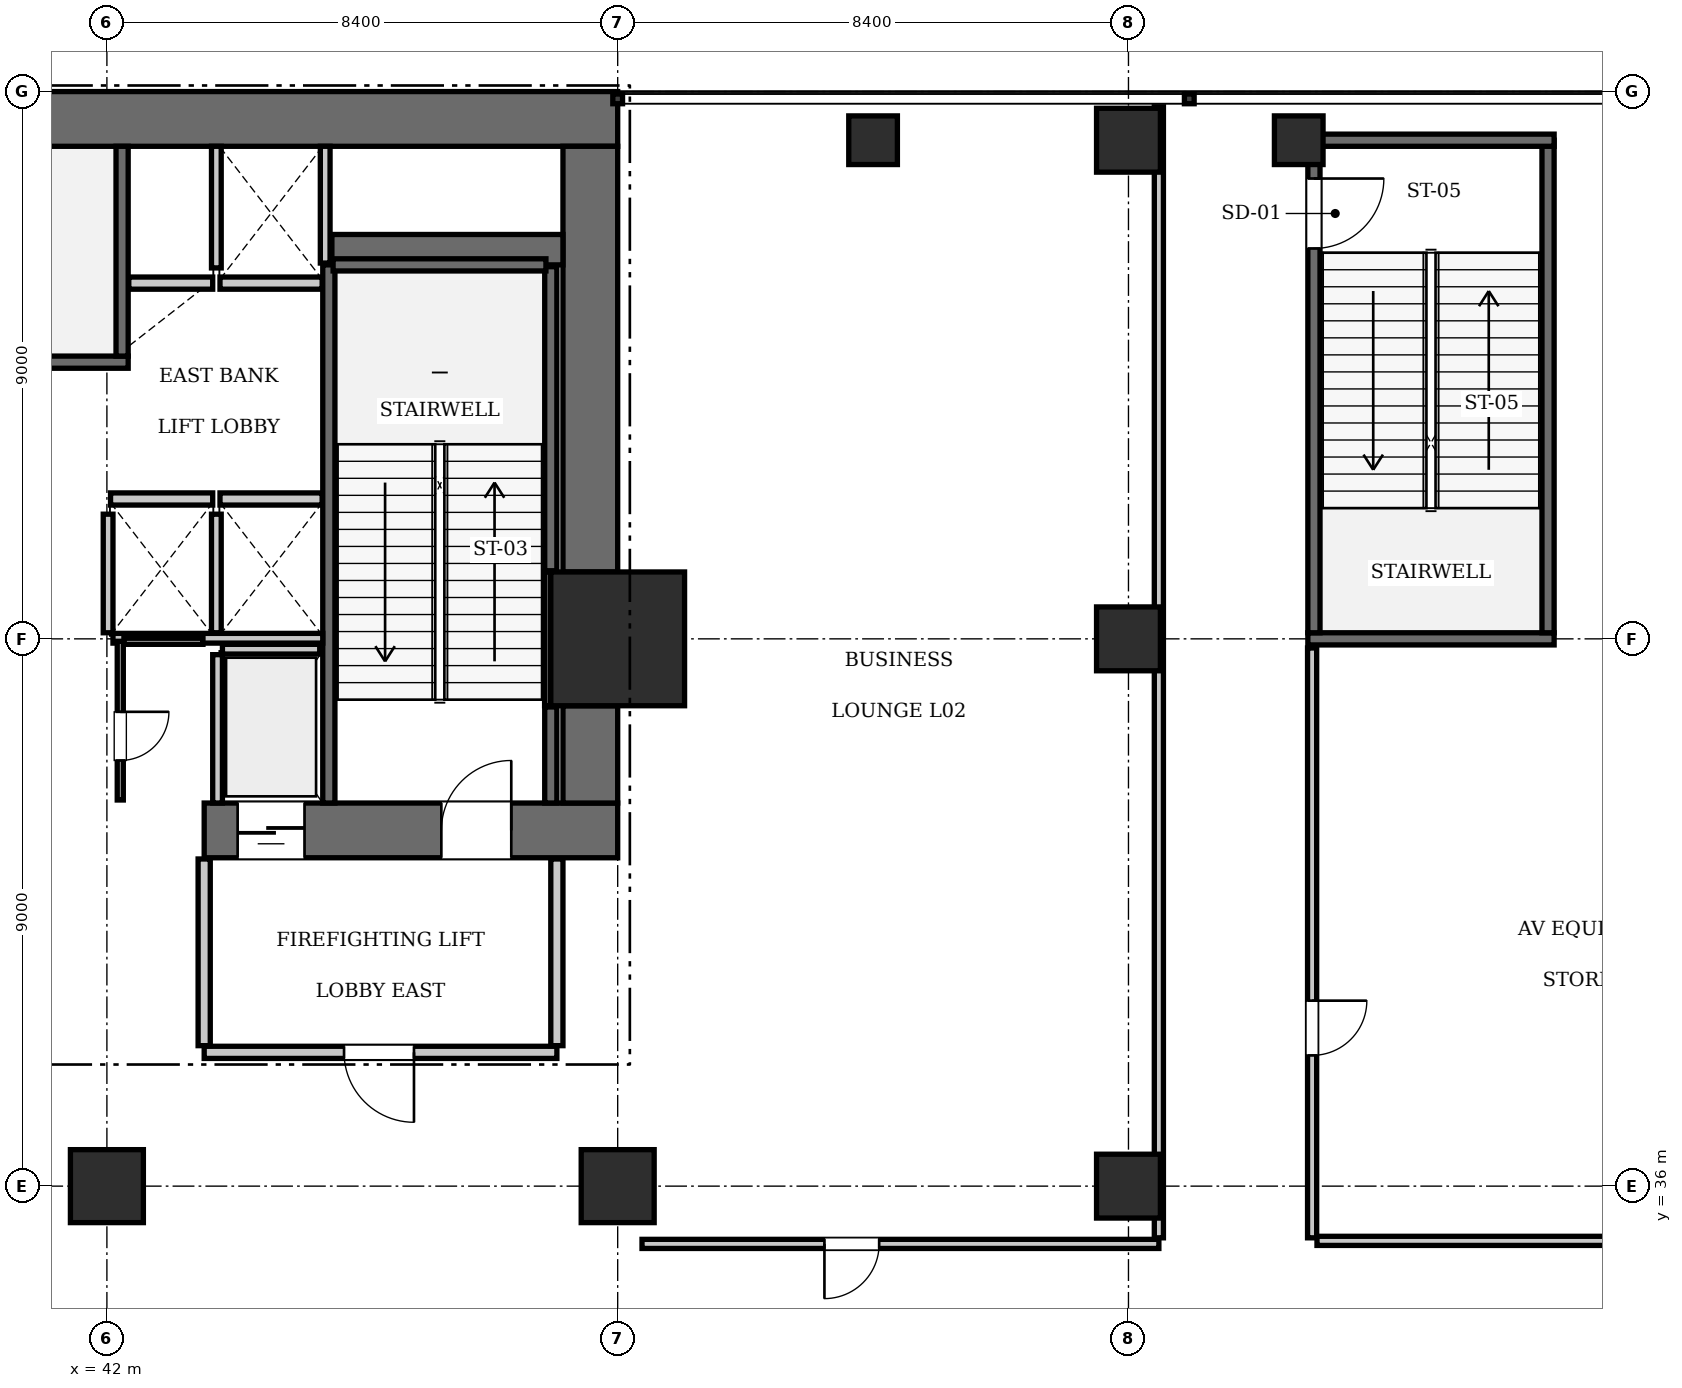
"""IFC4 building model, lengths in metres.
Left out: names, types, materials, properties, quantities, classifications, styles, units other than length and angle.
Written with IfcOpenShell. Run it as: python <this file> out.ifc"""

import sys

from ifc_helpers import new_model, si_unit, direction, frame, frame_2d, origin, origin_2d, place, context, subcontext, project, spatial, rectangle, extrude, element, fill, save


model = new_model("IFC4")
c1 = context("Model", 3, precision=1e-05, world=origin(), true_north=direction((0.0, 1.0)))
c2 = subcontext(c1, "Body", "Model", "MODEL_VIEW")
j1 = project(units=[si_unit("LENGTHUNIT", "METRE"), si_unit("PLANEANGLEUNIT", "RADIAN")], contexts=[c1])
p1 = place(None, origin())
s1 = spatial("IfcSite", under=j1, at=p1, CompositionType="ELEMENT")
p2 = place(p1, origin())
s2 = spatial("IfcBuilding", under=s1, at=p2, CompositionType="ELEMENT")
p3 = place(p2, frame((0.0, 0.0, 10.85)))
s3 = spatial("IfcBuildingStorey", under=s2, at=p3, CompositionType="ELEMENT", Elevation=10.85)
p4 = place(p3, frame((50.4, 45.0, 0.0), z_axis=(0.0, 0.0, 1.0), x_axis=(1.0, 0.0, 0.0)))
e1 = element("IfcColumn", 1, at=p4, inside=s3, PredefinedType="COLUMN", context=c2, shape_type="SweptSolid", body=[
    extrude(rectangle(XDim=2.2, YDim=2.2, at=origin_2d()), origin(), (0.0, 0.0, 1.0), 5.6),
])
p5 = place(p3, frame((25.2, 53.55, 0.0), z_axis=(0.0, 0.0, 1.0), x_axis=(1.0, 0.0, 0.0)))
e2 = element("IfcWall", 2, at=p5, inside=s3, PredefinedType="SHEAR", context=c2, shape_type="SweptSolid", body=[
    extrude(rectangle(XDim=25.2, YDim=0.9, at=frame_2d((12.6, 0.0))), origin(), (0.0, 0.0, 1.0), 5.6),
])
p6 = place(p3, frame((43.6, 41.85, 0.0), z_axis=(0.0, 0.0, 1.0), x_axis=(1.0, 0.0, 0.0)))
e3 = element("IfcWall", 3, at=p6, inside=s3, PredefinedType="SHEAR", context=c2, shape_type="SweptSolid", body=[
    extrude(rectangle(XDim=6.8, YDim=0.9, at=frame_2d((3.4, 0.0))), origin(), (0.0, 0.0, 1.0), 5.6),
])
p7 = place(p6, frame((3.9, 0.0, 0.0)))
e4 = element("IfcOpeningElement", 4, at=p7, cuts=e3, PredefinedType="OPENING", context=c2, shape_type="SweptSolid", body=[
    extrude(rectangle(XDim=1.15, YDim=2.15, at=frame_2d((0.575, 1.075))), frame((0.0, 0.46, 0.0), z_axis=(0.0, -1.0, 0.0), x_axis=(1.0, 0.0, 0.0)), (0.0, 0.0, 1.0), 0.92),
])
p8 = place(p6, frame((0.55, 0.0, 0.0)))
e5 = element("IfcOpeningElement", 5, at=p8, cuts=e3, PredefinedType="OPENING", context=c2, shape_type="SweptSolid", body=[
    extrude(rectangle(XDim=1.1, YDim=2.2, at=frame_2d((0.55, 1.1))), frame((0.0, 0.46, 0.0), z_axis=(0.0, -1.0, 0.0), x_axis=(1.0, 0.0, 0.0)), (0.0, 0.0, 1.0), 0.92),
])
p9 = place(p3, frame((49.95, 42.3, 0.0), z_axis=(0.0, 0.0, 1.0), x_axis=(0.0, 1.0, 0.0)))
e6 = element("IfcWall", 6, at=p9, inside=s3, PredefinedType="SHEAR", context=c2, shape_type="SweptSolid", body=[
    extrude(rectangle(XDim=1.6, YDim=0.9, at=frame_2d((0.8, 0.0))), origin(), (0.0, 0.0, 1.0), 5.6),
])
p10 = place(p3, frame((49.95, 46.1, 0.0), z_axis=(0.0, 0.0, 1.0), x_axis=(0.0, 1.0, 0.0)))
e7 = element("IfcWall", 7, at=p10, inside=s3, PredefinedType="SHEAR", context=c2, shape_type="SweptSolid", body=[
    extrude(rectangle(XDim=7.0, YDim=0.9, at=frame_2d((3.5, 0.0))), origin(), (0.0, 0.0, 1.0), 5.6),
])
p11 = place(p3, frame((45.7, 51.4, 0.0), z_axis=(0.0, 0.0, 1.0), x_axis=(1.0, 0.0, 0.0)))
e8 = element("IfcWall", 8, at=p11, inside=s3, PredefinedType="SHEAR", context=c2, shape_type="SweptSolid", body=[
    extrude(rectangle(XDim=3.8, YDim=0.5, at=frame_2d((1.9, 0.0))), origin(), (0.0, 0.0, 1.0), 5.6),
])
for number, where, z_axis, x_axis in (
    (9, (42.0, 36.0, 0.0), (0.0, 0.0, 1.0), (1.0, 0.0, 0.0)),
    (10, (50.4, 36.0, 0.0), (0.0, 0.0, 1.0), (1.0, 0.0, 0.0)),
):
    element("IfcColumn", number, at=place(p3, frame(where, z_axis=z_axis, x_axis=x_axis)), inside=s3, PredefinedType="COLUMN", context=c2, shape_type="SweptSolid", body=[
        extrude(rectangle(XDim=1.2, YDim=1.2, at=origin_2d()), origin(), (0.0, 0.0, 1.0), 5.6),
    ])
for number, where, z_axis, x_axis in (
    (11, (58.8, 36.0, 0.0), (0.0, 0.0, 1.0), (1.0, 0.0, 0.0)),
    (12, (58.8, 45.0, 0.0), (0.0, 0.0, 1.0), (1.0, 0.0, 0.0)),
    (13, (58.8, 53.2, 0.0), (0.0, 0.0, 1.0), (1.0, 0.0, 0.0)),
):
    element("IfcColumn", number, at=place(p3, frame(where, z_axis=z_axis, x_axis=x_axis)), inside=s3, PredefinedType="COLUMN", context=c2, shape_type="SweptSolid", body=[
        extrude(rectangle(XDim=1.05, YDim=1.05, at=origin_2d()), origin(), (0.0, 0.0, 1.0), 5.6),
    ])
for number, where, z_axis, x_axis in (
    (14, (54.6, 53.2, 0.0), (0.0, 0.0, 1.0), (1.0, 0.0, 0.0)),
    (15, (61.6, 53.2, 0.0), (0.0, 0.0, 1.0), (1.0, 0.0, 0.0)),
):
    element("IfcColumn", number, at=place(p3, frame(where, z_axis=z_axis, x_axis=x_axis)), inside=s3, PredefinedType="PILASTER", context=c2, shape_type="SweptSolid", body=[
        extrude(rectangle(XDim=0.8, YDim=0.8, at=origin_2d()), origin(), (0.0, 0.0, 1.0), 5.6),
    ])
p12 = place(p3, frame((33.25, 49.55, 0.0), z_axis=(0.0, 0.0, 1.0), x_axis=(1.0, 0.0, 0.0)))
e16 = element("IfcWall", 16, at=p12, inside=s3, PredefinedType="SOLIDWALL", context=c2, shape_type="SweptSolid", body=[
    extrude(rectangle(XDim=9.1, YDim=0.2, at=frame_2d((4.55, 0.0))), origin(), (0.0, 0.0, 1.0), 5.32),
])
p13 = place(p3, frame((42.25, 49.65, 0.0), z_axis=(0.0, 0.0, 1.0), x_axis=(0.0, 1.0, 0.0)))
e17 = element("IfcWall", 17, at=p13, inside=s3, PredefinedType="SOLIDWALL", context=c2, shape_type="SweptSolid", body=[
    extrude(rectangle(XDim=3.45, YDim=0.2, at=frame_2d((1.725, 0.0))), origin(), (0.0, 0.0, 1.0), 5.32),
])
p14 = place(p3, frame((45.65, 42.3, 0.0), z_axis=(0.0, 0.0, 1.0), x_axis=(0.0, 1.0, 0.0)))
e18 = element("IfcWall", 18, at=p14, inside=s3, PredefinedType="SOLIDWALL", context=c2, shape_type="SweptSolid", body=[
    extrude(rectangle(XDim=8.85, YDim=0.2, at=frame_2d((4.425, 0.0))), origin(), (0.0, 0.0, 1.0), 5.32),
])
p15 = place(p3, frame((49.3, 42.3, 0.0), z_axis=(0.0, 0.0, 1.0), x_axis=(0.0, 1.0, 0.0)))
e19 = element("IfcWall", 19, at=p15, inside=s3, PredefinedType="SOLIDWALL", context=c2, shape_type="SweptSolid", body=[
    extrude(rectangle(XDim=1.58, YDim=0.2, at=frame_2d((0.79, 0.0))), origin(), (0.0, 0.0, 1.0), 5.32),
])
p16 = place(p3, frame((49.3, 46.12, 0.0), z_axis=(0.0, 0.0, 1.0), x_axis=(0.0, 1.0, 0.0)))
e20 = element("IfcWall", 20, at=p16, inside=s3, PredefinedType="SOLIDWALL", context=c2, shape_type="SweptSolid", body=[
    extrude(rectangle(XDim=5.0, YDim=0.2, at=frame_2d((2.5, 0.0))), origin(), (0.0, 0.0, 1.0), 5.32),
])
p17 = place(p3, frame((45.72, 51.15, 0.0), z_axis=(0.0, 0.0, 1.0), x_axis=(1.0, 0.0, 0.0)))
e21 = element("IfcWall", 21, at=p17, inside=s3, PredefinedType="SOLIDWALL", context=c2, shape_type="SweptSolid", body=[
    extrude(rectangle(XDim=3.5, YDim=0.2, at=frame_2d((1.75, 0.0))), origin(), (0.0, 0.0, 1.0), 5.32),
])
p18 = place(p3, frame((49.248, 43.9, 0.0), z_axis=(0.0, 0.0, 1.0), x_axis=(0.0, 1.0, 0.0)))
e22 = element("IfcWall", 22, at=p18, inside=s3, PredefinedType="SOLIDWALL", context=c2, shape_type="SweptSolid", body=[
    extrude(rectangle(XDim=2.2, YDim=0.1, at=frame_2d((1.1, 0.0))), origin(), (0.0, 0.0, 1.0), 5.32),
])
p19 = place(p3, frame((61.75, 45.0, 0.0), z_axis=(0.0, 0.0, 1.0), x_axis=(1.0, 0.0, 0.0)))
e23 = element("IfcWall", 23, at=p19, inside=s3, PredefinedType="SOLIDWALL", context=c2, shape_type="SweptSolid", body=[
    extrude(rectangle(XDim=4.05, YDim=0.2, at=frame_2d((2.025, 0.0))), origin(), (0.0, 0.0, 1.0), 4.685),
])
p20 = place(p3, frame((61.85, 45.1, 0.0), z_axis=(0.0, 0.0, 1.0), x_axis=(0.0, 1.0, 0.0)))
e24 = element("IfcWall", 24, at=p20, inside=s3, PredefinedType="SOLIDWALL", context=c2, shape_type="SweptSolid", body=[
    extrude(rectangle(XDim=8.1, YDim=0.2, at=frame_2d((4.05, 0.0))), origin(), (0.0, 0.0, 1.0), 5.32),
])
p21 = place(p20, frame((6.32, 0.0, 0.0)))
e25 = element("IfcOpeningElement", 25, at=p21, cuts=e24, PredefinedType="OPENING", context=c2, shape_type="SweptSolid", body=[
    extrude(rectangle(XDim=1.15, YDim=2.15, at=frame_2d((0.575, 1.075))), frame((0.0, 0.11, 0.0), z_axis=(0.0, -1.0, 0.0), x_axis=(1.0, 0.0, 0.0)), (0.0, 0.0, 1.0), 0.22),
])
p22 = place(p3, frame((65.7, 45.1, 0.0), z_axis=(0.0, 0.0, 1.0), x_axis=(0.0, 1.0, 0.0)))
e26 = element("IfcWall", 26, at=p22, inside=s3, PredefinedType="SOLIDWALL", context=c2, shape_type="SweptSolid", body=[
    extrude(rectangle(XDim=8.1, YDim=0.2, at=frame_2d((4.05, 0.0))), origin(), (0.0, 0.0, 1.0), 5.32),
])
p23 = place(p3, frame((61.75, 53.2, 0.0), z_axis=(0.0, 0.0, 1.0), x_axis=(1.0, 0.0, 0.0)))
e27 = element("IfcWall", 27, at=p23, inside=s3, PredefinedType="SOLIDWALL", context=c2, shape_type="SweptSolid", body=[
    extrude(rectangle(XDim=4.05, YDim=0.2, at=frame_2d((2.025, 0.0))), origin(), (0.0, 0.0, 1.0), 5.32),
])
for number, where, z_axis, x_axis in (
    (28, (42.06, 47.3, 0.0), (0.0, 0.0, 1.0), (1.0, 0.0, 0.0)),
    (29, (43.86, 47.3, 0.0), (0.0, 0.0, 1.0), (1.0, 0.0, 0.0)),
):
    element("IfcWall", number, at=place(p3, frame(where, z_axis=z_axis, x_axis=x_axis)), inside=s3, PredefinedType="SOLIDWALL", context=c2, shape_type="SweptSolid", body=[
        extrude(rectangle(XDim=1.68, YDim=0.2, at=frame_2d((0.84, 0.0))), origin(), (0.0, 0.0, 1.0), 5.32),
    ])
p24 = place(p3, frame((42.36, 50.85, 0.0), z_axis=(0.0, 0.0, 1.0), x_axis=(1.0, 0.0, 0.0)))
e30 = element("IfcWall", 30, at=p24, inside=s3, PredefinedType="SOLIDWALL", context=c2, shape_type="SweptSolid", body=[
    extrude(rectangle(XDim=1.38, YDim=0.2, at=frame_2d((0.69, 0.0))), origin(), (0.0, 0.0, 1.0), 5.32),
])
p25 = place(p3, frame((43.86, 50.85, 0.0), z_axis=(0.0, 0.0, 1.0), x_axis=(1.0, 0.0, 0.0)))
e31 = element("IfcWall", 31, at=p25, inside=s3, PredefinedType="SOLIDWALL", context=c2, shape_type="SweptSolid", body=[
    extrude(rectangle(XDim=1.68, YDim=0.2, at=frame_2d((0.84, 0.0))), origin(), (0.0, 0.0, 1.0), 5.32),
])
p26 = place(p3, frame((43.9, 44.83, 0.0), z_axis=(0.0, 0.0, 1.0), x_axis=(1.0, 0.0, 0.0)))
e32 = element("IfcWall", 32, at=p26, inside=s3, PredefinedType="SOLIDWALL", context=c2, shape_type="SweptSolid", body=[
    extrude(rectangle(XDim=1.6, YDim=0.16, at=frame_2d((0.8, 0.0))), origin(), (0.0, 0.0, 1.0), 5.32),
])
p27 = place(p3, frame((43.82, 42.3, 0.0), z_axis=(0.0, 0.0, 1.0), x_axis=(0.0, 1.0, 0.0)))
e33 = element("IfcWall", 33, at=p27, inside=s3, PredefinedType="SOLIDWALL", context=c2, shape_type="SweptSolid", body=[
    extrude(rectangle(XDim=2.44, YDim=0.16, at=frame_2d((1.22, 0.0))), origin(), (0.0, 0.0, 1.0), 5.32),
])
for number, where, z_axis, x_axis in (
    (34, (42.02, 45.1, 0.0), (0.0, 0.0, 1.0), (0.0, 1.0, 0.0)),
    (35, (43.8, 45.1, 0.0), (0.0, 0.0, 1.0), (0.0, 1.0, 0.0)),
):
    element("IfcWall", number, at=place(p3, frame(where, z_axis=z_axis, x_axis=x_axis)), inside=s3, PredefinedType="SOLIDWALL", context=c2, shape_type="SweptSolid", body=[
        extrude(rectangle(XDim=1.95, YDim=0.16, at=frame_2d((0.975, 0.0))), origin(), (0.0, 0.0, 1.0), 5.32),
    ])
p28 = place(p3, frame((42.1, 45.01, 0.0), z_axis=(0.0, 0.0, 1.0), x_axis=(1.0, 0.0, 0.0)))
e36 = element("IfcWall", 36, at=p28, inside=s3, PredefinedType="SOLIDWALL", context=c2, shape_type="SweptSolid", body=[
    extrude(rectangle(XDim=3.45, YDim=0.16, at=frame_2d((1.725, 0.0))), origin(), (0.0, 0.0, 1.0), 5.32),
])
p29 = place(p3, frame((45.59, 51.18, 0.0), z_axis=(0.0, 0.0, 1.0), x_axis=(0.0, 1.0, 0.0)))
e37 = element("IfcWall", 37, at=p29, inside=s3, PredefinedType="SOLIDWALL", context=c2, shape_type="SweptSolid", body=[
    extrude(rectangle(XDim=1.92, YDim=0.16, at=frame_2d((0.96, 0.0))), origin(), (0.0, 0.0, 1.0), 5.32),
])
p30 = place(p3, frame((43.8, 51.1, 0.0), z_axis=(0.0, 0.0, 1.0), x_axis=(0.0, 1.0, 0.0)))
e38 = element("IfcWall", 38, at=p30, inside=s3, PredefinedType="SOLIDWALL", context=c2, shape_type="SweptSolid", body=[
    extrude(rectangle(XDim=2.0, YDim=0.16, at=frame_2d((1.0, 0.0))), origin(), (0.0, 0.0, 1.0), 5.32),
])
p31 = place(p3, frame((43.6, 38.2, 0.0), z_axis=(0.0, 0.0, 1.0), x_axis=(1.0, 0.0, 0.0)))
e39 = element("IfcWall", 39, at=p31, inside=s3, PredefinedType="PARTITIONING", context=c2, shape_type="SweptSolid", body=[
    extrude(rectangle(XDim=5.8, YDim=0.2, at=frame_2d((2.9, 0.0))), origin(), (0.0, 0.0, 1.0), 5.32),
])
p32 = place(p31, frame((2.3, 0.0, 0.0)))
e40 = element("IfcOpeningElement", 40, at=p32, cuts=e39, PredefinedType="OPENING", context=c2, shape_type="SweptSolid", body=[
    extrude(rectangle(XDim=1.15, YDim=2.15, at=frame_2d((0.575, 1.075))), frame((0.0, 0.11, 0.0), z_axis=(0.0, -1.0, 0.0), x_axis=(1.0, 0.0, 0.0)), (0.0, 0.0, 1.0), 0.22),
])
for number, where, z_axis, x_axis in (
    (41, (43.6, 38.31, 0.0), (0.0, 0.0, 1.0), (0.0, 1.0, 0.0)),
    (42, (49.4, 38.31, 0.0), (0.0, 0.0, 1.0), (0.0, 1.0, 0.0)),
):
    element("IfcWall", number, at=place(p3, frame(where, z_axis=z_axis, x_axis=x_axis)), inside=s3, PredefinedType="PARTITIONING", context=c2, shape_type="SweptSolid", body=[
        extrude(rectangle(XDim=3.07, YDim=0.2, at=frame_2d((1.535, 0.0))), origin(), (0.0, 0.0, 1.0), 5.32),
    ])
p33 = place(p3, frame((42.22, 42.35, 0.0), z_axis=(0.0, 0.0, 1.0), x_axis=(0.0, 1.0, 0.0)))
e43 = element("IfcWall", 43, at=p33, inside=s3, PredefinedType="PARTITIONING", context=c2, shape_type="SweptSolid", body=[
    extrude(rectangle(XDim=2.61, YDim=0.1, at=frame_2d((1.305, 0.0))), origin(), (0.0, 0.0, 1.0), 5.32),
])
p34 = place(p33, frame((0.65, 0.0, 0.0)))
e44 = element("IfcOpeningElement", 44, at=p34, cuts=e43, PredefinedType="OPENING", context=c2, shape_type="SweptSolid", body=[
    extrude(rectangle(XDim=0.8, YDim=2.05, at=frame_2d((0.4, 1.025))), frame((0.0, 0.06, 0.0), z_axis=(0.0, -1.0, 0.0), x_axis=(1.0, 0.0, 0.0)), (0.0, 0.0, 1.0), 0.12),
])
p35 = place(p3, frame((42.28, 44.96, 0.0), z_axis=(0.0, 0.0, 1.0), x_axis=(1.0, 0.0, 0.0)))
e45 = element("IfcWall", 45, at=p35, inside=s3, PredefinedType="PARTITIONING", context=c2, shape_type="SweptSolid", body=[
    extrude(rectangle(XDim=1.3, YDim=0.1, at=frame_2d((0.65, 0.0))), origin(), (0.0, 0.0, 1.0), 5.32),
])
p36 = place(p3, frame((50.8, 35.05, 0.0), z_axis=(0.0, 0.0, 1.0), x_axis=(1.0, 0.0, 0.0)))
e46 = element("IfcWall", 46, at=p36, inside=s3, PredefinedType="PARTITIONING", context=c2, shape_type="SweptSolid", body=[
    extrude(rectangle(XDim=8.5, YDim=0.15, at=frame_2d((4.25, 0.0))), origin(), (0.0, 0.0, 1.0), 5.32),
])
p37 = place(p36, frame((3.0, 0.0, 0.0)))
e47 = element("IfcOpeningElement", 47, at=p37, cuts=e46, PredefinedType="OPENING", context=c2, shape_type="SweptSolid", body=[
    extrude(rectangle(XDim=0.9, YDim=2.1, at=frame_2d((0.45, 1.05))), frame((0.0, 0.085, 0.0), z_axis=(0.0, -1.0, 0.0), x_axis=(1.0, 0.0, 0.0)), (0.0, 0.0, 1.0), 0.17),
])
p38 = place(p3, frame((59.3, 35.15, 0.0), z_axis=(0.0, 0.0, 1.0), x_axis=(0.0, 1.0, 0.0)))
e48 = element("IfcWall", 48, at=p38, inside=s3, PredefinedType="PARTITIONING", context=c2, shape_type="SweptSolid", body=[
    extrude(rectangle(XDim=18.6, YDim=0.15, at=frame_2d((9.3, 0.0))), origin(), (0.0, 0.0, 1.0), 5.32),
])
p39 = place(p3, frame((61.82, 35.15, 0.0), z_axis=(0.0, 0.0, 1.0), x_axis=(0.0, 1.0, 0.0)))
e49 = element("IfcWall", 49, at=p39, inside=s3, PredefinedType="PARTITIONING", context=c2, shape_type="SweptSolid", body=[
    extrude(rectangle(XDim=9.7, YDim=0.15, at=frame_2d((4.85, 0.0))), origin(), (0.0, 0.0, 1.0), 5.32),
])
p40 = place(p39, frame((3.0, 0.0, 0.0)))
e50 = element("IfcOpeningElement", 50, at=p40, cuts=e49, PredefinedType="OPENING", context=c2, shape_type="SweptSolid", body=[
    extrude(rectangle(XDim=0.9, YDim=2.1, at=frame_2d((0.45, 1.05))), frame((0.0, 0.085, 0.0), z_axis=(0.0, -1.0, 0.0), x_axis=(1.0, 0.0, 0.0)), (0.0, 0.0, 1.0), 0.17),
])
p41 = place(p3, frame((61.9, 35.1, 0.0), z_axis=(0.0, 0.0, 1.0), x_axis=(1.0, 0.0, 0.0)))
e51 = element("IfcWall", 51, at=p41, inside=s3, PredefinedType="PARTITIONING", context=c2, shape_type="SweptSolid", body=[
    extrude(rectangle(XDim=9.35, YDim=0.15, at=frame_2d((4.675, 0.0))), origin(), (0.0, 0.0, 1.0), 5.32),
])
p42 = place(p7, origin())
e52 = element("IfcDoor", 52, at=p42, inside=s3, OperationType="SINGLE_SWING_RIGHT", PredefinedType="DOOR", context=c2, shape_type="SweptSolid", body=[
    extrude(rectangle(XDim=1.15, YDim=2.15, at=frame_2d((0.575, 1.075))), frame((0.0, 0.025, 0.0), z_axis=(0.0, -1.0, 0.0), x_axis=(1.0, 0.0, 0.0)), (0.0, 0.0, 1.0), 0.05),
])
fill(e4, e52)
p43 = place(p21, frame((1.15, 0.0, 0.0), z_axis=(0.0, 0.0, 1.0), x_axis=(-1.0, 0.0, 0.0)))
e53 = element("IfcDoor", 53, at=p43, inside=s3, OperationType="SINGLE_SWING_LEFT", PredefinedType="DOOR", context=c2, shape_type="SweptSolid", body=[
    extrude(rectangle(XDim=1.15, YDim=2.15, at=frame_2d((0.575, 1.075))), frame((0.0, 0.025, 0.0), z_axis=(0.0, -1.0, 0.0), x_axis=(1.0, 0.0, 0.0)), (0.0, 0.0, 1.0), 0.05),
])
fill(e25, e53)
p44 = place(p8, frame((1.1, 0.0, 0.0), z_axis=(0.0, 0.0, 1.0), x_axis=(-1.0, 0.0, 0.0)))
e54 = element("IfcDoor", 54, at=p44, inside=s3, OperationType="SLIDING_TO_LEFT", PredefinedType="DOOR", context=c2, shape_type="SweptSolid", body=[
    extrude(rectangle(XDim=1.1, YDim=2.2, at=frame_2d((0.55, 1.1))), frame((0.0, 0.025, 0.0), z_axis=(0.0, -1.0, 0.0), x_axis=(1.0, 0.0, 0.0)), (0.0, 0.0, 1.0), 0.05),
])
fill(e5, e54)
p45 = place(p32, frame((1.15, 0.0, 0.0), z_axis=(0.0, 0.0, 1.0), x_axis=(-1.0, 0.0, 0.0)))
e55 = element("IfcDoor", 55, at=p45, inside=s3, OperationType="SINGLE_SWING_LEFT", PredefinedType="DOOR", context=c2, shape_type="SweptSolid", body=[
    extrude(rectangle(XDim=1.15, YDim=2.15, at=frame_2d((0.575, 1.075))), frame((0.0, 0.025, 0.0), z_axis=(0.0, -1.0, 0.0), x_axis=(1.0, 0.0, 0.0)), (0.0, 0.0, 1.0), 0.05),
])
fill(e40, e55)
p46 = place(p34, frame((0.8, 0.0, 0.0), z_axis=(0.0, 0.0, 1.0), x_axis=(-1.0, 0.0, 0.0)))
e56 = element("IfcDoor", 56, at=p46, inside=s3, OperationType="SINGLE_SWING_LEFT", PredefinedType="DOOR", context=c2, shape_type="SweptSolid", body=[
    extrude(rectangle(XDim=0.8, YDim=2.05, at=frame_2d((0.4, 1.025))), frame((0.0, 0.025, 0.0), z_axis=(0.0, -1.0, 0.0), x_axis=(1.0, 0.0, 0.0)), (0.0, 0.0, 1.0), 0.05),
])
fill(e44, e56)
p47 = place(p37, frame((0.9, 0.0, 0.0), z_axis=(0.0, 0.0, 1.0), x_axis=(-1.0, 0.0, 0.0)))
e57 = element("IfcDoor", 57, at=p47, inside=s3, OperationType="SINGLE_SWING_RIGHT", PredefinedType="DOOR", context=c2, shape_type="SweptSolid", body=[
    extrude(rectangle(XDim=0.9, YDim=2.1, at=frame_2d((0.45, 1.05))), frame((0.0, 0.025, 0.0), z_axis=(0.0, -1.0, 0.0), x_axis=(1.0, 0.0, 0.0)), (0.0, 0.0, 1.0), 0.05),
])
fill(e47, e57)
p48 = place(p40, frame((0.9, 0.0, 0.0), z_axis=(0.0, 0.0, 1.0), x_axis=(-1.0, 0.0, 0.0)))
e58 = element("IfcDoor", 58, at=p48, inside=s3, OperationType="SINGLE_SWING_LEFT", PredefinedType="DOOR", context=c2, shape_type="SweptSolid", body=[
    extrude(rectangle(XDim=0.9, YDim=2.1, at=frame_2d((0.45, 1.05))), frame((0.0, 0.025, 0.0), z_axis=(0.0, -1.0, 0.0), x_axis=(1.0, 0.0, 0.0)), (0.0, 0.0, 1.0), 0.05),
])
fill(e50, e58)
save(model, sys.argv[1])
